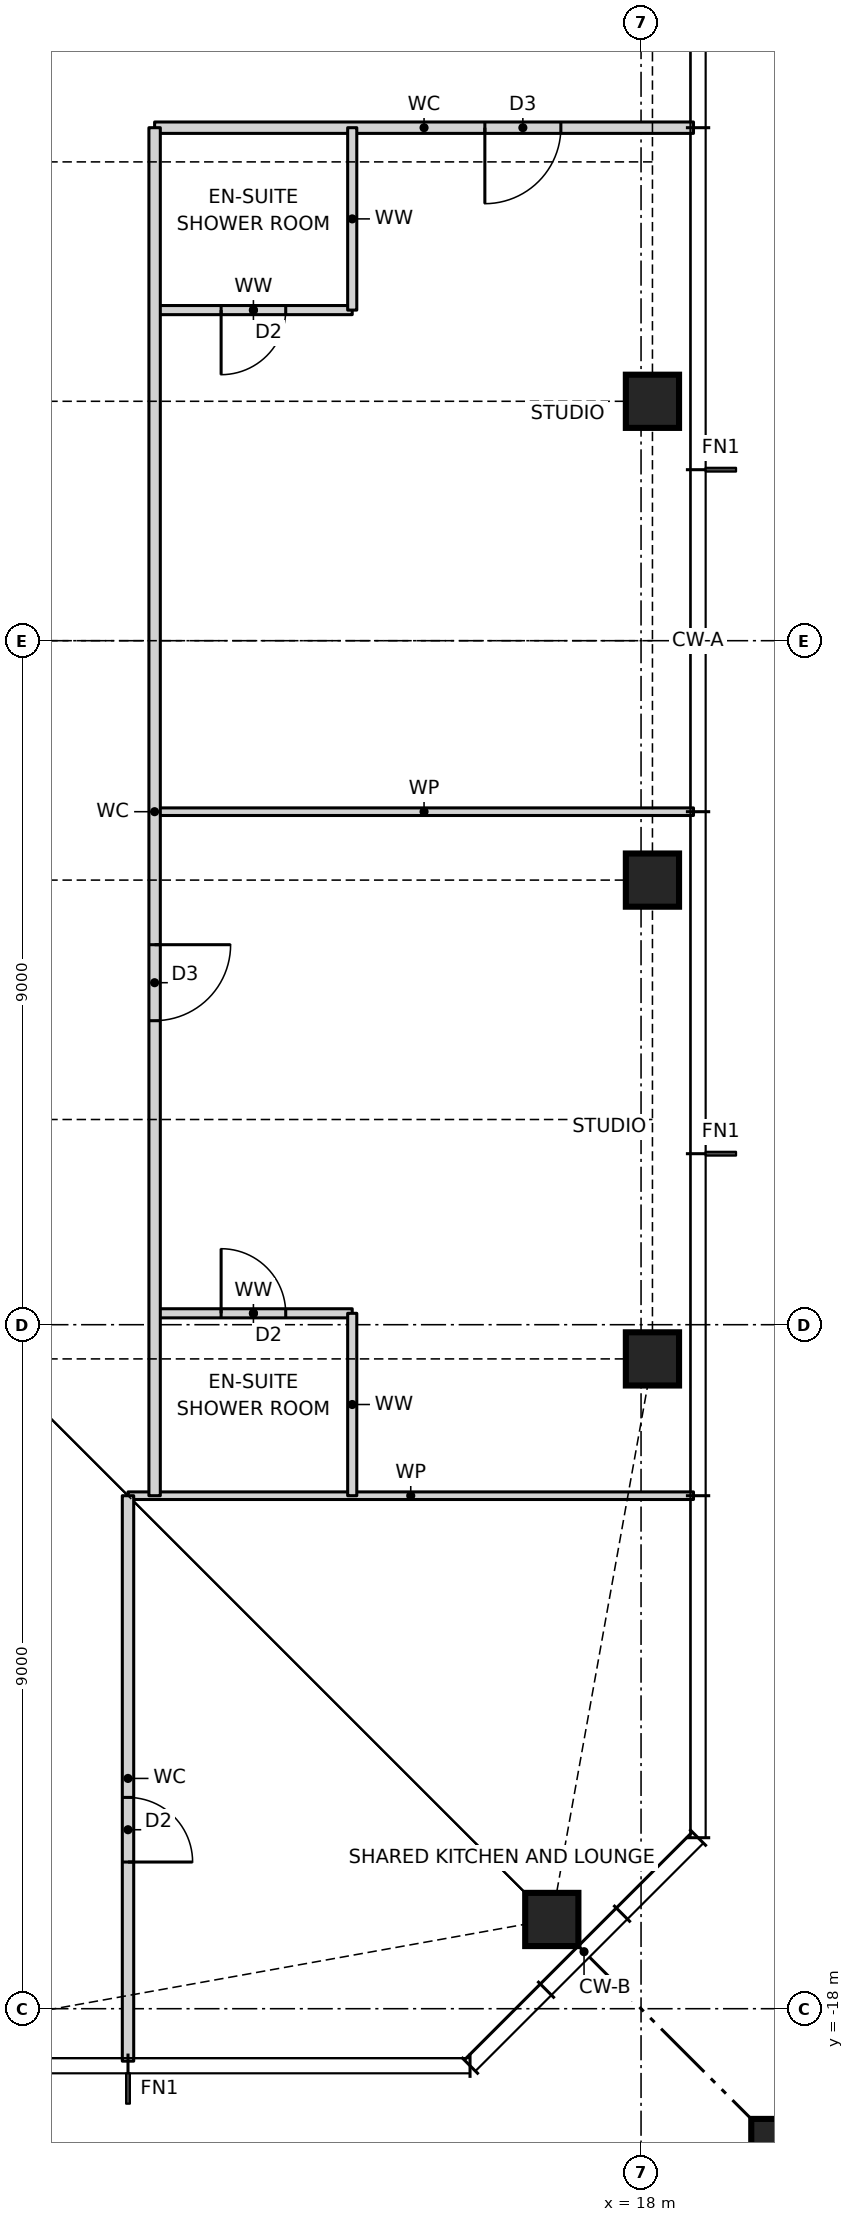
"""IFC4 building model, lengths in metres.
Left out: names, types, materials, properties, quantities, classifications, styles, units other than length and angle.
Written with IfcOpenShell. Run it as: python <this file> out.ifc"""

import sys

from ifc_helpers import new_model, si_unit, direction, frame, frame_2d, origin, origin_2d, place, context, subcontext, project, spatial, rectangle, hollow_rectangle, i_section, extrude, element, fill, save


model = new_model("IFC4")
c1 = context("Model", 3, precision=1e-05, world=origin(), true_north=direction((0.0, 1.0)))
c2 = subcontext(c1, "Body", "Model", "MODEL_VIEW")
j1 = project(units=[si_unit("LENGTHUNIT", "METRE"), si_unit("PLANEANGLEUNIT", "RADIAN")], contexts=[c1])
p1 = place(None, origin())
s1 = spatial("IfcSite", under=j1, at=p1, CompositionType="ELEMENT")
p2 = place(p1, origin())
s2 = spatial("IfcBuilding", under=s1, at=p2, CompositionType="ELEMENT")
p3 = place(p2, frame((0.0, 0.0, 195.0)))
s3 = spatial("IfcBuildingStorey", under=s2, at=p3, CompositionType="ELEMENT", Elevation=195.0)
for number, where, z_axis, x_axis in (
    (1, (16.826, -16.826, 0.0), (0.0, 0.0, 1.0), (1.0, 0.0, 0.0)),
    (2, (18.15, -9.45, 0.0), (0.0, 0.0, 1.0), (1.0, 0.0, 0.0)),
    (3, (18.15, -3.15, 0.0), (0.0, 0.0, 1.0), (1.0, 0.0, 0.0)),
    (4, (18.15, 3.15, 0.0), (0.0, 0.0, 1.0), (1.0, 0.0, 0.0)),
):
    element("IfcColumn", number, at=place(p3, frame(where, z_axis=z_axis, x_axis=x_axis)), inside=s3, PredefinedType="COLUMN", context=c2, shape_type="SweptSolid", body=[
        extrude(hollow_rectangle(XDim=0.7, YDim=0.7, WallThickness=0.06, at=origin_2d()), origin(), (0.0, 0.0, 1.0), 3.5),
    ])
p4 = place(p3, frame((21.65, -21.65, 0.0), z_axis=(0.0, 0.0, 1.0), x_axis=(1.0, 0.0, 0.0)))
e5 = element("IfcColumn", 5, at=p4, inside=s3, PredefinedType="COLUMN", context=c2, shape_type="SweptSolid", body=[
    extrude(rectangle(XDim=4.4, YDim=4.4, at=origin_2d()), origin(), (0.0, 0.0, 1.0), 3.5),
    extrude(i_section(OverallWidth=0.478, OverallDepth=0.599, WebThickness=0.1, FlangeThickness=0.14, at=origin_2d()), origin(), (0.0, 0.0, 1.0), 3.5),
])
p5 = place(p3, frame((11.25, -11.25, 0.0), z_axis=(0.0, 0.0, 1.0), x_axis=(1.0, 0.0, 0.0)))
e6 = element("IfcWall", 6, at=p5, inside=s3, PredefinedType="PARTITIONING", context=c2, shape_type="SweptSolid", body=[
    extrude(rectangle(XDim=7.44, YDim=0.1, at=frame_2d((3.72, 0.0))), origin(), (0.0, 0.0, 1.0), 3.27),
])
p6 = place(p3, frame((11.6, -8.85, 0.0), z_axis=(0.0, 0.0, 1.0), x_axis=(1.0, 0.0, 0.0)))
e7 = element("IfcWall", 7, at=p6, inside=s3, PredefinedType="PARTITIONING", context=c2, shape_type="SweptSolid", body=[
    extrude(rectangle(XDim=2.6, YDim=0.12, at=frame_2d((1.3, 0.0))), origin(), (0.0, 0.0, 1.0), 3.27),
])
p7 = place(p6, frame((0.875, 0.0, 0.0)))
e8 = element("IfcOpeningElement", 8, at=p7, cuts=e7, PredefinedType="OPENING", context=c2, shape_type="SweptSolid", body=[
    extrude(rectangle(XDim=0.85, YDim=2.1, at=frame_2d((0.425, 1.05))), frame((0.0, 0.07, 0.0), z_axis=(0.0, -1.0, 0.0), x_axis=(1.0, 0.0, 0.0)), (0.0, 0.0, 1.0), 0.14),
])
p8 = place(p3, frame((11.6, -2.25, 0.0), z_axis=(0.0, 0.0, 1.0), x_axis=(1.0, 0.0, 0.0)))
e9 = element("IfcWall", 9, at=p8, inside=s3, PredefinedType="PARTITIONING", context=c2, shape_type="SweptSolid", body=[
    extrude(rectangle(XDim=7.09, YDim=0.1, at=frame_2d((3.545, 0.0))), origin(), (0.0, 0.0, 1.0), 3.27),
])
p9 = place(p3, frame((11.6, 4.35, 0.0), z_axis=(0.0, 0.0, 1.0), x_axis=(1.0, 0.0, 0.0)))
e10 = element("IfcWall", 10, at=p9, inside=s3, PredefinedType="PARTITIONING", context=c2, shape_type="SweptSolid", body=[
    extrude(rectangle(XDim=2.6, YDim=0.12, at=frame_2d((1.3, 0.0))), origin(), (0.0, 0.0, 1.0), 3.27),
])
p10 = place(p9, frame((0.875, 0.0, 0.0)))
e11 = element("IfcOpeningElement", 11, at=p10, cuts=e10, PredefinedType="OPENING", context=c2, shape_type="SweptSolid", body=[
    extrude(rectangle(XDim=0.85, YDim=2.1, at=frame_2d((0.425, 1.05))), frame((0.0, 0.07, 0.0), z_axis=(0.0, -1.0, 0.0), x_axis=(1.0, 0.0, 0.0)), (0.0, 0.0, 1.0), 0.14),
])
p11 = place(p3, frame((11.6, 6.75, 0.0), z_axis=(0.0, 0.0, 1.0), x_axis=(1.0, 0.0, 0.0)))
e12 = element("IfcWall", 12, at=p11, inside=s3, PredefinedType="PARTITIONING", context=c2, shape_type="SweptSolid", body=[
    extrude(rectangle(XDim=7.09, YDim=0.15, at=frame_2d((3.545, 0.0))), origin(), (0.0, 0.0, 1.0), 3.27),
])
p12 = place(p11, frame((4.345, 0.0, 0.0)))
e13 = element("IfcOpeningElement", 13, at=p12, cuts=e12, PredefinedType="OPENING", context=c2, shape_type="SweptSolid", body=[
    extrude(rectangle(XDim=1.0, YDim=2.1, at=frame_2d((0.5, 1.05))), frame((0.0, 0.085, 0.0), z_axis=(0.0, -1.0, 0.0), x_axis=(1.0, 0.0, 0.0)), (0.0, 0.0, 1.0), 0.17),
])
for number, where, z_axis, x_axis in (
    (14, (14.2, -11.25, 0.0), (0.0, 0.0, 1.0), (0.0, 1.0, 0.0)),
    (15, (14.2, 4.35, 0.0), (0.0, 0.0, 1.0), (0.0, 1.0, 0.0)),
):
    element("IfcWall", number, at=place(p3, frame(where, z_axis=z_axis, x_axis=x_axis)), inside=s3, PredefinedType="PARTITIONING", context=c2, shape_type="SweptSolid", body=[
        extrude(rectangle(XDim=2.4, YDim=0.12, at=frame_2d((1.2, 0.0))), origin(), (0.0, 0.0, 1.0), 3.27),
    ])
p13 = place(p3, frame((11.6, -11.25, 0.0), z_axis=(0.0, 0.0, 1.0), x_axis=(0.0, 1.0, 0.0)))
e16 = element("IfcWall", 16, at=p13, inside=s3, PredefinedType="PARTITIONING", context=c2, shape_type="SweptSolid", body=[
    extrude(rectangle(XDim=18.0, YDim=0.15, at=frame_2d((9.0, 0.0))), origin(), (0.0, 0.0, 1.0), 3.27),
])
p14 = place(p13, frame((6.25, 0.0, 0.0)))
e17 = element("IfcOpeningElement", 17, at=p14, cuts=e16, PredefinedType="OPENING", context=c2, shape_type="SweptSolid", body=[
    extrude(rectangle(XDim=1.0, YDim=2.1, at=frame_2d((0.5, 1.05))), frame((0.0, 0.085, 0.0), z_axis=(0.0, -1.0, 0.0), x_axis=(1.0, 0.0, 0.0)), (0.0, 0.0, 1.0), 0.17),
])
p15 = place(p3, frame((11.25, -18.69, 0.0), z_axis=(0.0, 0.0, 1.0), x_axis=(0.0, 1.0, 0.0)))
e18 = element("IfcWall", 18, at=p15, inside=s3, PredefinedType="PARTITIONING", context=c2, shape_type="SweptSolid", body=[
    extrude(rectangle(XDim=7.44, YDim=0.15, at=frame_2d((3.72, 0.0))), origin(), (0.0, 0.0, 1.0), 3.27),
])
p16 = place(p15, frame((2.62, 0.0, 0.0)))
e19 = element("IfcOpeningElement", 19, at=p16, cuts=e18, PredefinedType="OPENING", context=c2, shape_type="SweptSolid", body=[
    extrude(rectangle(XDim=0.85, YDim=2.1, at=frame_2d((0.425, 1.05))), frame((0.0, 0.085, 0.0), z_axis=(0.0, -1.0, 0.0), x_axis=(1.0, 0.0, 0.0)), (0.0, 0.0, 1.0), 0.17),
])
p17 = place(p14, frame((1.0, 0.0, 0.0), z_axis=(0.0, 0.0, 1.0), x_axis=(-1.0, 0.0, 0.0)))
e20 = element("IfcDoor", 20, at=p17, inside=s3, OperationType="SINGLE_SWING_LEFT", PredefinedType="DOOR", context=c2, shape_type="SweptSolid", body=[
    extrude(rectangle(XDim=1.0, YDim=2.1, at=frame_2d((0.5, 1.05))), frame((0.0, 0.025, 0.0), z_axis=(0.0, -1.0, 0.0), x_axis=(1.0, 0.0, 0.0)), (0.0, 0.0, 1.0), 0.05),
])
fill(e17, e20)
p18 = place(p7, origin())
e21 = element("IfcDoor", 21, at=p18, inside=s3, OperationType="SINGLE_SWING_LEFT", PredefinedType="DOOR", context=c2, shape_type="SweptSolid", body=[
    extrude(rectangle(XDim=0.85, YDim=2.1, at=frame_2d((0.425, 1.05))), frame((0.0, 0.025, 0.0), z_axis=(0.0, -1.0, 0.0), x_axis=(1.0, 0.0, 0.0)), (0.0, 0.0, 1.0), 0.05),
])
fill(e8, e21)
p19 = place(p12, frame((1.0, 0.0, 0.0), z_axis=(0.0, 0.0, 1.0), x_axis=(-1.0, 0.0, 0.0)))
e22 = element("IfcDoor", 22, at=p19, inside=s3, OperationType="SINGLE_SWING_RIGHT", PredefinedType="DOOR", context=c2, shape_type="SweptSolid", body=[
    extrude(rectangle(XDim=1.0, YDim=2.1, at=frame_2d((0.5, 1.05))), frame((0.0, 0.025, 0.0), z_axis=(0.0, -1.0, 0.0), x_axis=(1.0, 0.0, 0.0)), (0.0, 0.0, 1.0), 0.05),
])
fill(e13, e22)
p20 = place(p10, frame((0.85, 0.0, 0.0), z_axis=(0.0, 0.0, 1.0), x_axis=(-1.0, 0.0, 0.0)))
e23 = element("IfcDoor", 23, at=p20, inside=s3, OperationType="SINGLE_SWING_RIGHT", PredefinedType="DOOR", context=c2, shape_type="SweptSolid", body=[
    extrude(rectangle(XDim=0.85, YDim=2.1, at=frame_2d((0.425, 1.05))), frame((0.0, 0.025, 0.0), z_axis=(0.0, -1.0, 0.0), x_axis=(1.0, 0.0, 0.0)), (0.0, 0.0, 1.0), 0.05),
])
fill(e11, e23)
p21 = place(p16, frame((0.85, 0.0, 0.0), z_axis=(0.0, 0.0, 1.0), x_axis=(-1.0, 0.0, 0.0)))
e24 = element("IfcDoor", 24, at=p21, inside=s3, OperationType="SINGLE_SWING_RIGHT", PredefinedType="DOOR", context=c2, shape_type="SweptSolid", body=[
    extrude(rectangle(XDim=0.85, YDim=2.1, at=frame_2d((0.425, 1.05))), frame((0.0, 0.025, 0.0), z_axis=(0.0, -1.0, 0.0), x_axis=(1.0, 0.0, 0.0)), (0.0, 0.0, 1.0), 0.05),
])
fill(e19, e24)
save(model, sys.argv[1])
